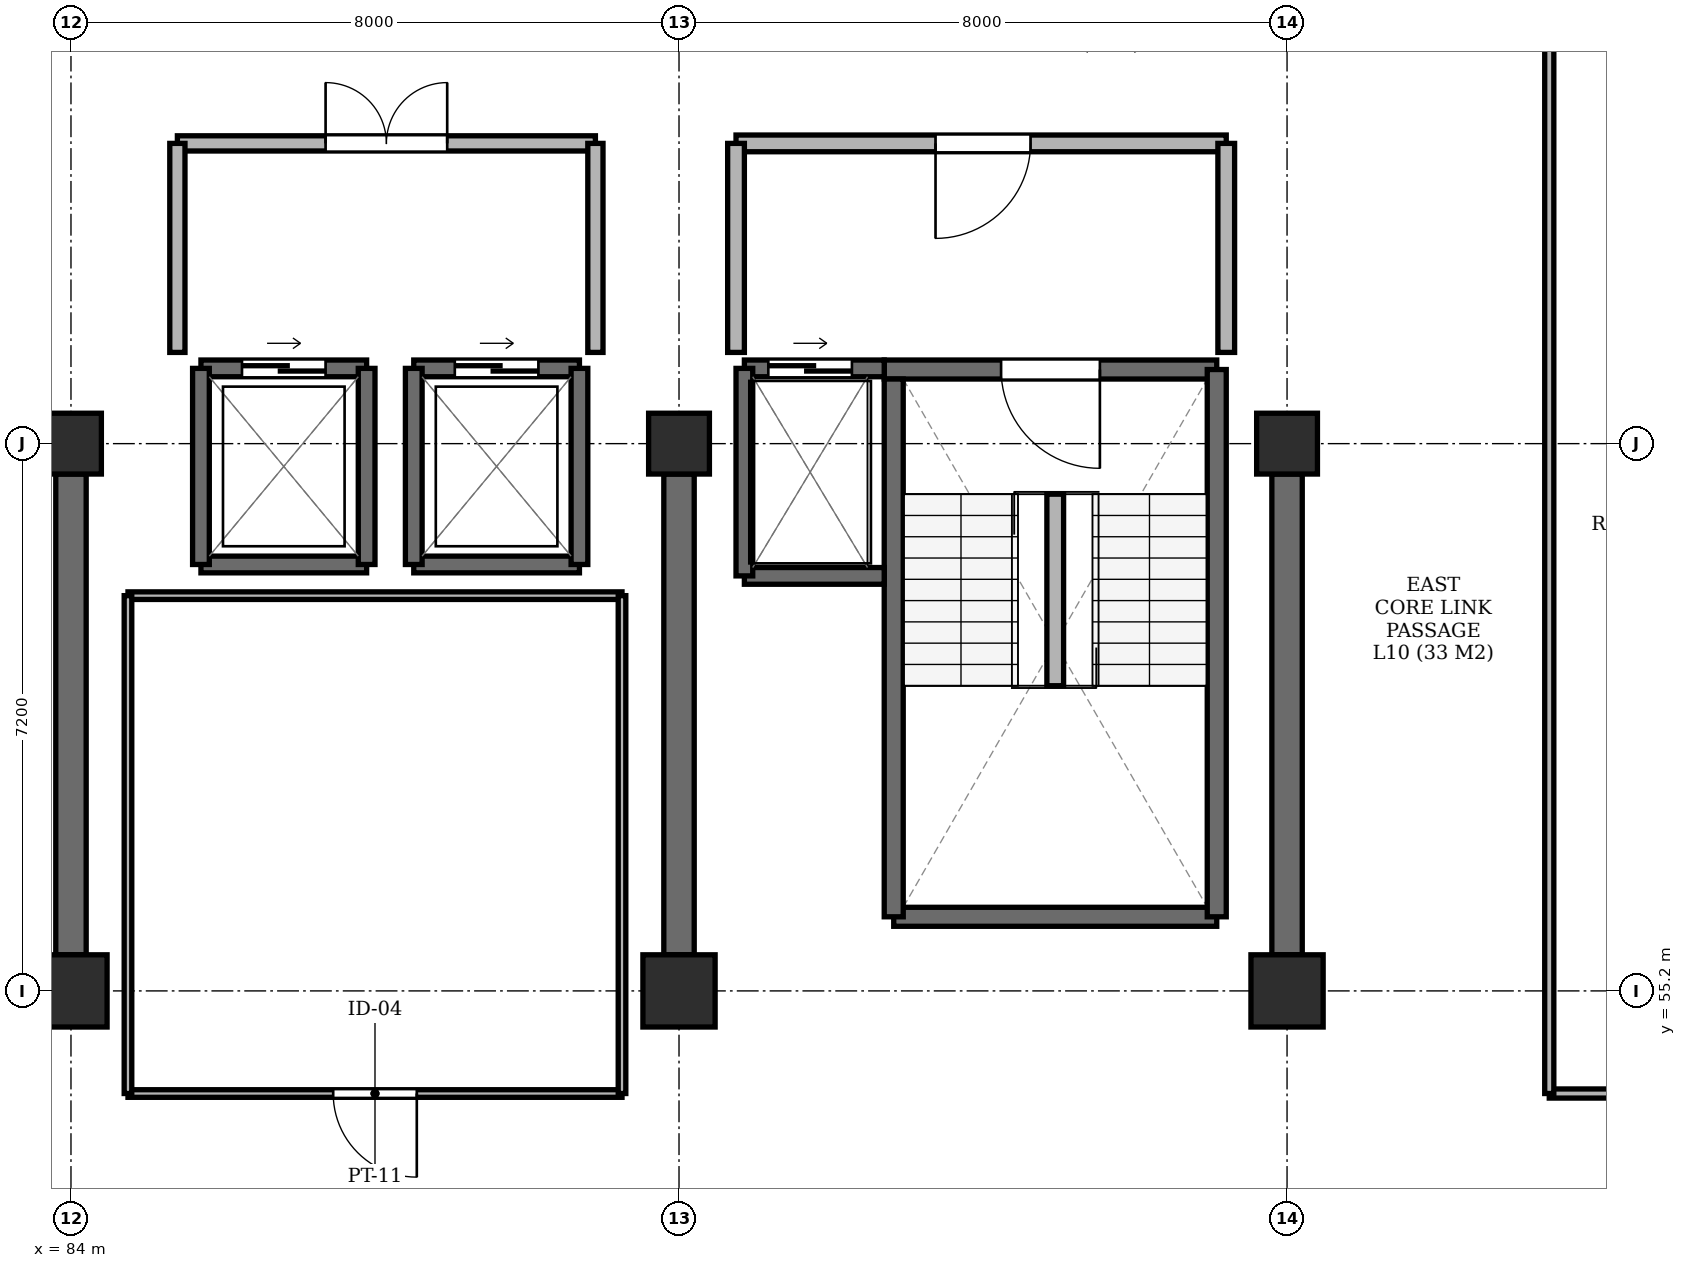
"""IFC4 building model, lengths in metres.
Left out: names, types, materials, properties, quantities, classifications, styles, units other than length and angle.
Written with IfcOpenShell. Run it as: python <this file> out.ifc"""

import sys

from ifc_helpers import new_model, si_unit, direction, frame, frame_2d, origin, origin_2d, place, context, subcontext, project, spatial, rectangle, extrude, element, fill, save


model = new_model("IFC4")
c1 = context("Model", 3, precision=1e-05, world=origin(), true_north=direction((0.0, 1.0)))
c2 = subcontext(c1, "Body", "Model", "MODEL_VIEW")
j1 = project(units=[si_unit("LENGTHUNIT", "METRE"), si_unit("PLANEANGLEUNIT", "RADIAN")], contexts=[c1])
p1 = place(None, origin())
s1 = spatial("IfcSite", under=j1, at=p1, CompositionType="ELEMENT")
p2 = place(p1, origin())
s2 = spatial("IfcBuilding", under=s1, at=p2, CompositionType="ELEMENT")
p3 = place(p2, frame((0.0, 0.0, 43.8)))
s3 = spatial("IfcBuildingStorey", under=s2, at=p3, CompositionType="ELEMENT", Elevation=43.8)
p4 = place(p3, frame((84.0, 55.2, -0.24), z_axis=(0.0, 0.0, 1.0), x_axis=(1.0, 0.0, 0.0)))
e1 = element("IfcColumn", 1, at=p4, inside=s3, PredefinedType="COLUMN", context=c2, shape_type="SweptSolid", body=[
    extrude(rectangle(XDim=0.95, YDim=0.95, at=origin_2d()), origin(), (0.0, 0.0, 1.0), 3.26),
])
p5 = place(p3, frame((84.0, 62.4, -0.24), z_axis=(0.0, 0.0, 1.0), x_axis=(1.0, 0.0, 0.0)))
e2 = element("IfcColumn", 2, at=p5, inside=s3, PredefinedType="COLUMN", context=c2, shape_type="SweptSolid", body=[
    extrude(rectangle(XDim=0.8, YDim=0.8, at=origin_2d()), origin(), (0.0, 0.0, 1.0), 3.26),
])
p6 = place(p3, frame((92.0, 55.2, -0.24), z_axis=(0.0, 0.0, 1.0), x_axis=(1.0, 0.0, 0.0)))
e3 = element("IfcColumn", 3, at=p6, inside=s3, PredefinedType="COLUMN", context=c2, shape_type="SweptSolid", body=[
    extrude(rectangle(XDim=0.95, YDim=0.95, at=origin_2d()), origin(), (0.0, 0.0, 1.0), 3.26),
])
p7 = place(p3, frame((92.0, 62.4, -0.24), z_axis=(0.0, 0.0, 1.0), x_axis=(1.0, 0.0, 0.0)))
e4 = element("IfcColumn", 4, at=p7, inside=s3, PredefinedType="COLUMN", context=c2, shape_type="SweptSolid", body=[
    extrude(rectangle(XDim=0.8, YDim=0.8, at=origin_2d()), origin(), (0.0, 0.0, 1.0), 3.26),
])
p8 = place(p3, frame((100.0, 55.2, -0.24), z_axis=(0.0, 0.0, 1.0), x_axis=(1.0, 0.0, 0.0)))
e5 = element("IfcColumn", 5, at=p8, inside=s3, PredefinedType="COLUMN", context=c2, shape_type="SweptSolid", body=[
    extrude(rectangle(XDim=0.95, YDim=0.95, at=origin_2d()), origin(), (0.0, 0.0, 1.0), 3.26),
])
p9 = place(p3, frame((100.0, 62.4, -0.24), z_axis=(0.0, 0.0, 1.0), x_axis=(1.0, 0.0, 0.0)))
e6 = element("IfcColumn", 6, at=p9, inside=s3, PredefinedType="COLUMN", context=c2, shape_type="SweptSolid", body=[
    extrude(rectangle(XDim=0.8, YDim=0.8, at=origin_2d()), origin(), (0.0, 0.0, 1.0), 3.26),
])
for number, where, z_axis, x_axis in (
    (7, (84.0, 55.675, 0.0), (0.0, 0.0, 1.0), (0.0, 1.0, 0.0)),
    (8, (92.0, 55.675, 0.0), (0.0, 0.0, 1.0), (0.0, 1.0, 0.0)),
    (9, (100.0, 55.675, 0.0), (0.0, 0.0, 1.0), (0.0, 1.0, 0.0)),
):
    element("IfcWall", number, at=place(p3, frame(where, z_axis=z_axis, x_axis=x_axis)), inside=s3, PredefinedType="SHEAR", context=c2, shape_type="SweptSolid", body=[
        extrude(rectangle(XDim=6.325, YDim=0.4, at=frame_2d((3.163, 0.0))), origin(), (0.0, 0.0, 1.0), 3.02),
    ])
p10 = place(p3, frame((94.825, 56.175, 0.0), z_axis=(0.0, 0.0, 1.0), x_axis=(1.0, 0.0, 0.0)))
e10 = element("IfcWall", 10, at=p10, inside=s3, PredefinedType="SHEAR", context=c2, shape_type="SweptSolid", body=[
    extrude(rectangle(XDim=4.25, YDim=0.25, at=frame_2d((2.125, 0.0))), origin(), (0.0, 0.0, 1.0), 3.02),
])
p11 = place(p3, frame((99.075, 63.375, 0.0), z_axis=(0.0, 0.0, 1.0), x_axis=(-1.0, 0.0, 0.0)))
e11 = element("IfcWall", 11, at=p11, inside=s3, PredefinedType="SHEAR", context=c2, shape_type="SweptSolid", body=[
    extrude(rectangle(XDim=4.375, YDim=0.25, at=frame_2d((2.188, 0.0))), origin(), (0.0, 0.0, 1.0), 3.02),
])
p12 = place(p11, frame((1.538, 0.0, 0.0)))
e12 = element("IfcOpeningElement", 12, at=p12, cuts=e11, PredefinedType="OPENING", context=c2, shape_type="SweptSolid", body=[
    extrude(rectangle(XDim=1.3, YDim=2.2, at=frame_2d((0.65, 1.1))), frame((0.0, 0.137, 0.0), z_axis=(0.0, -1.0, 0.0), x_axis=(1.0, 0.0, 0.0)), (0.0, 0.0, 1.0), 0.274),
])
p13 = place(p3, frame((94.825, 63.25, 0.0), z_axis=(0.0, 0.0, 1.0), x_axis=(0.0, -1.0, 0.0)))
e13 = element("IfcWall", 13, at=p13, inside=s3, PredefinedType="SHEAR", context=c2, shape_type="SweptSolid", body=[
    extrude(rectangle(XDim=7.075, YDim=0.25, at=frame_2d((3.538, 0.0))), origin(), (0.0, 0.0, 1.0), 3.02),
])
p14 = place(p3, frame((99.075, 56.175, 0.0), z_axis=(0.0, 0.0, 1.0), x_axis=(0.0, 1.0, 0.0)))
e14 = element("IfcWall", 14, at=p14, inside=s3, PredefinedType="SHEAR", context=c2, shape_type="SweptSolid", body=[
    extrude(rectangle(XDim=7.2, YDim=0.25, at=frame_2d((3.6, 0.0))), origin(), (0.0, 0.0, 1.0), 3.02),
])
p15 = place(p3, frame((96.95, 59.215, 0.0), z_axis=(0.0, 0.0, 1.0), x_axis=(0.0, 1.0, 0.0)))
e15 = element("IfcWall", 15, at=p15, inside=s3, PredefinedType="PARTITIONING", context=c2, shape_type="SweptSolid", body=[
    extrude(rectangle(XDim=2.52, YDim=0.22, at=frame_2d((1.26, 0.0))), origin(), (0.0, 0.0, 1.0), 3.02),
])
p16 = place(p3, frame((92.86, 60.66, 0.0), z_axis=(0.0, 0.0, 1.0), x_axis=(1.0, 0.0, 0.0)))
e16 = element("IfcWall", 16, at=p16, inside=s3, PredefinedType="SHEAR", context=c2, shape_type="SweptSolid", body=[
    extrude(rectangle(XDim=1.84, YDim=0.22, at=frame_2d((0.92, 0.0))), origin(), (0.0, 0.0, 1.0), 3.02),
])
p17 = place(p3, frame((94.7, 63.39, 0.0), z_axis=(0.0, 0.0, 1.0), x_axis=(-1.0, 0.0, 0.0)))
e17 = element("IfcWall", 17, at=p17, inside=s3, PredefinedType="SHEAR", context=c2, shape_type="SweptSolid", body=[
    extrude(rectangle(XDim=1.84, YDim=0.22, at=frame_2d((0.92, 0.0))), origin(), (0.0, 0.0, 1.0), 3.02),
])
p18 = place(p17, frame((0.425, 0.0, 0.0)))
e18 = element("IfcOpeningElement", 18, at=p18, cuts=e17, PredefinedType="OPENING", context=c2, shape_type="SweptSolid", body=[
    extrude(rectangle(XDim=1.1, YDim=2.2, at=frame_2d((0.55, 1.1))), frame((0.0, 0.122, 0.0), z_axis=(0.0, -1.0, 0.0), x_axis=(1.0, 0.0, 0.0)), (0.0, 0.0, 1.0), 0.244),
])
p19 = place(p3, frame((92.86, 63.39, 0.0), z_axis=(0.0, 0.0, 1.0), x_axis=(0.0, -1.0, 0.0)))
e19 = element("IfcWall", 19, at=p19, inside=s3, PredefinedType="SHEAR", context=c2, shape_type="SweptSolid", body=[
    extrude(rectangle(XDim=2.73, YDim=0.22, at=frame_2d((1.365, 0.0))), origin(), (0.0, 0.0, 1.0), 3.02),
])
p20 = place(p3, frame((85.71, 60.81, 0.0), z_axis=(0.0, 0.0, 1.0), x_axis=(1.0, 0.0, 0.0)))
e20 = element("IfcWall", 20, at=p20, inside=s3, PredefinedType="SHEAR", context=c2, shape_type="SweptSolid", body=[
    extrude(rectangle(XDim=2.18, YDim=0.22, at=frame_2d((1.09, 0.0))), origin(), (0.0, 0.0, 1.0), 3.02),
])
p21 = place(p3, frame((87.89, 63.39, 0.0), z_axis=(0.0, 0.0, 1.0), x_axis=(-1.0, 0.0, 0.0)))
e21 = element("IfcWall", 21, at=p21, inside=s3, PredefinedType="SHEAR", context=c2, shape_type="SweptSolid", body=[
    extrude(rectangle(XDim=2.18, YDim=0.22, at=frame_2d((1.09, 0.0))), origin(), (0.0, 0.0, 1.0), 3.02),
])
p22 = place(p21, frame((0.54, 0.0, 0.0)))
e22 = element("IfcOpeningElement", 22, at=p22, cuts=e21, PredefinedType="OPENING", context=c2, shape_type="SweptSolid", body=[
    extrude(rectangle(XDim=1.1, YDim=2.2, at=frame_2d((0.55, 1.1))), frame((0.0, 0.122, 0.0), z_axis=(0.0, -1.0, 0.0), x_axis=(1.0, 0.0, 0.0)), (0.0, 0.0, 1.0), 0.244),
])
for number, where, z_axis, x_axis in (
    (23, (85.71, 63.39, 0.0), (0.0, 0.0, 1.0), (0.0, -1.0, 0.0)),
    (24, (87.89, 60.81, 0.0), (0.0, 0.0, 1.0), (0.0, 1.0, 0.0)),
):
    element("IfcWall", number, at=place(p3, frame(where, z_axis=z_axis, x_axis=x_axis)), inside=s3, PredefinedType="SHEAR", context=c2, shape_type="SweptSolid", body=[
        extrude(rectangle(XDim=2.58, YDim=0.22, at=frame_2d((1.29, 0.0))), origin(), (0.0, 0.0, 1.0), 3.02),
    ])
p23 = place(p3, frame((88.51, 60.81, 0.0), z_axis=(0.0, 0.0, 1.0), x_axis=(1.0, 0.0, 0.0)))
e25 = element("IfcWall", 25, at=p23, inside=s3, PredefinedType="SHEAR", context=c2, shape_type="SweptSolid", body=[
    extrude(rectangle(XDim=2.18, YDim=0.22, at=frame_2d((1.09, 0.0))), origin(), (0.0, 0.0, 1.0), 3.02),
])
p24 = place(p3, frame((90.69, 63.39, 0.0), z_axis=(0.0, 0.0, 1.0), x_axis=(-1.0, 0.0, 0.0)))
e26 = element("IfcWall", 26, at=p24, inside=s3, PredefinedType="SHEAR", context=c2, shape_type="SweptSolid", body=[
    extrude(rectangle(XDim=2.18, YDim=0.22, at=frame_2d((1.09, 0.0))), origin(), (0.0, 0.0, 1.0), 3.02),
])
p25 = place(p24, frame((0.54, 0.0, 0.0)))
e27 = element("IfcOpeningElement", 27, at=p25, cuts=e26, PredefinedType="OPENING", context=c2, shape_type="SweptSolid", body=[
    extrude(rectangle(XDim=1.1, YDim=2.2, at=frame_2d((0.55, 1.1))), frame((0.0, 0.122, 0.0), z_axis=(0.0, -1.0, 0.0), x_axis=(1.0, 0.0, 0.0)), (0.0, 0.0, 1.0), 0.244),
])
for number, where, z_axis, x_axis in (
    (28, (88.51, 63.39, 0.0), (0.0, 0.0, 1.0), (0.0, -1.0, 0.0)),
    (29, (90.69, 60.81, 0.0), (0.0, 0.0, 1.0), (0.0, 1.0, 0.0)),
):
    element("IfcWall", number, at=place(p3, frame(where, z_axis=z_axis, x_axis=x_axis)), inside=s3, PredefinedType="SHEAR", context=c2, shape_type="SweptSolid", body=[
        extrude(rectangle(XDim=2.58, YDim=0.22, at=frame_2d((1.29, 0.0))), origin(), (0.0, 0.0, 1.0), 3.02),
    ])
p26 = place(p3, frame((92.75, 66.35, 0.0), z_axis=(0.0, 0.0, 1.0), x_axis=(1.0, 0.0, 0.0)))
e30 = element("IfcWall", 30, at=p26, inside=s3, PredefinedType="PARTITIONING", context=c2, shape_type="SweptSolid", body=[
    extrude(rectangle(XDim=6.45, YDim=0.22, at=frame_2d((3.225, 0.0))), origin(), (0.0, 0.0, 1.0), 2.53),
])
p27 = place(p26, frame((2.625, 0.0, 0.0)))
e31 = element("IfcOpeningElement", 31, at=p27, cuts=e30, PredefinedType="OPENING", context=c2, shape_type="SweptSolid", body=[
    extrude(rectangle(XDim=1.25, YDim=2.2, at=frame_2d((0.625, 1.1))), frame((0.0, 0.122, 0.0), z_axis=(0.0, -1.0, 0.0), x_axis=(1.0, 0.0, 0.0)), (0.0, 0.0, 1.0), 0.244),
])
for number, where, z_axis, x_axis in (
    (32, (92.75, 63.6, 0.0), (0.0, 0.0, 1.0), (0.0, 1.0, 0.0)),
    (33, (99.2, 63.6, 0.0), (0.0, 0.0, 1.0), (0.0, 1.0, 0.0)),
):
    element("IfcWall", number, at=place(p3, frame(where, z_axis=z_axis, x_axis=x_axis)), inside=s3, PredefinedType="PARTITIONING", context=c2, shape_type="SweptSolid", body=[
        extrude(rectangle(XDim=2.75, YDim=0.22, at=frame_2d((1.375, 0.0))), origin(), (0.0, 0.0, 1.0), 2.53),
    ])
p28 = place(p3, frame((85.4, 66.35, 0.0), z_axis=(0.0, 0.0, 1.0), x_axis=(1.0, 0.0, 0.0)))
e34 = element("IfcWall", 34, at=p28, inside=s3, PredefinedType="PARTITIONING", context=c2, shape_type="SweptSolid", body=[
    extrude(rectangle(XDim=5.5, YDim=0.2, at=frame_2d((2.75, 0.0))), origin(), (0.0, 0.0, 1.0), 2.53),
])
p29 = place(p28, frame((1.95, 0.0, 0.0)))
e35 = element("IfcOpeningElement", 35, at=p29, cuts=e34, PredefinedType="OPENING", context=c2, shape_type="SweptSolid", body=[
    extrude(rectangle(XDim=1.6, YDim=2.2, at=frame_2d((0.8, 1.1))), frame((0.0, 0.112, 0.0), z_axis=(0.0, -1.0, 0.0), x_axis=(1.0, 0.0, 0.0)), (0.0, 0.0, 1.0), 0.224),
])
for number, where, z_axis, x_axis in (
    (36, (85.4, 63.6, 0.0), (0.0, 0.0, 1.0), (0.0, 1.0, 0.0)),
    (37, (90.9, 63.6, 0.0), (0.0, 0.0, 1.0), (0.0, 1.0, 0.0)),
):
    element("IfcWall", number, at=place(p3, frame(where, z_axis=z_axis, x_axis=x_axis)), inside=s3, PredefinedType="PARTITIONING", context=c2, shape_type="SweptSolid", body=[
        extrude(rectangle(XDim=2.75, YDim=0.2, at=frame_2d((1.375, 0.0))), origin(), (0.0, 0.0, 1.0), 2.53),
    ])
p30 = place(p3, frame((103.45, 53.85, 0.0), z_axis=(0.0, 0.0, 1.0), x_axis=(1.0, 0.0, 0.0)))
e38 = element("IfcWall", 38, at=p30, inside=s3, PredefinedType="PARTITIONING", context=c2, shape_type="SweptSolid", body=[
    extrude(rectangle(XDim=3.75, YDim=0.12, at=frame_2d((1.875, 0.0))), origin(), (0.0, 0.0, 1.0), 2.53),
])
p31 = place(p30, frame((1.35, 0.0, 0.0)))
e39 = element("IfcOpeningElement", 39, at=p31, cuts=e38, PredefinedType="OPENING", context=c2, shape_type="SweptSolid", body=[
    extrude(rectangle(XDim=1.0, YDim=2.15, at=frame_2d((0.5, 1.075))), frame((0.0, 0.072, 0.0), z_axis=(0.0, -1.0, 0.0), x_axis=(1.0, 0.0, 0.0)), (0.0, 0.0, 1.0), 0.144),
])
p32 = place(p3, frame((103.45, 53.85, 0.0), z_axis=(0.0, 0.0, 1.0), x_axis=(0.0, 1.0, 0.0)))
e40 = element("IfcWall", 40, at=p32, inside=s3, PredefinedType="PARTITIONING", context=c2, shape_type="SweptSolid", body=[
    extrude(rectangle(XDim=14.95, YDim=0.12, at=frame_2d((7.475, 0.0))), origin(), (0.0, 0.0, 1.0), 2.53),
])
p33 = place(p3, frame((84.75, 53.85, 0.0), z_axis=(0.0, 0.0, 1.0), x_axis=(1.0, 0.0, 0.0)))
e41 = element("IfcWall", 41, at=p33, inside=s3, PredefinedType="PARTITIONING", context=c2, shape_type="SweptSolid", body=[
    extrude(rectangle(XDim=6.5, YDim=0.1, at=frame_2d((3.25, 0.0))), origin(), (0.0, 0.0, 1.0), 2.53),
])
p34 = place(p33, frame((2.7, 0.0, 0.0)))
e42 = element("IfcOpeningElement", 42, at=p34, cuts=e41, PredefinedType="OPENING", context=c2, shape_type="SweptSolid", body=[
    extrude(rectangle(XDim=1.1, YDim=2.15, at=frame_2d((0.55, 1.075))), frame((0.0, 0.062, 0.0), z_axis=(0.0, -1.0, 0.0), x_axis=(1.0, 0.0, 0.0)), (0.0, 0.0, 1.0), 0.124),
])
p35 = place(p3, frame((84.75, 60.4, 0.0), z_axis=(0.0, 0.0, 1.0), x_axis=(1.0, 0.0, 0.0)))
e43 = element("IfcWall", 43, at=p35, inside=s3, PredefinedType="PARTITIONING", context=c2, shape_type="SweptSolid", body=[
    extrude(rectangle(XDim=6.5, YDim=0.1, at=frame_2d((3.25, 0.0))), origin(), (0.0, 0.0, 1.0), 2.53),
])
for number, where, z_axis, x_axis in (
    (44, (84.75, 53.85, 0.0), (0.0, 0.0, 1.0), (0.0, 1.0, 0.0)),
    (45, (91.25, 53.85, 0.0), (0.0, 0.0, 1.0), (0.0, 1.0, 0.0)),
):
    element("IfcWall", number, at=place(p3, frame(where, z_axis=z_axis, x_axis=x_axis)), inside=s3, PredefinedType="PARTITIONING", context=c2, shape_type="SweptSolid", body=[
        extrude(rectangle(XDim=6.55, YDim=0.1, at=frame_2d((3.275, 0.0))), origin(), (0.0, 0.0, 1.0), 2.53),
    ])
p36 = place(p12, origin())
e46 = element("IfcDoor", 46, at=p36, inside=s3, OperationType="SINGLE_SWING_LEFT", PredefinedType="DOOR", context=c2, shape_type="SweptSolid", body=[
    extrude(rectangle(XDim=1.3, YDim=2.2, at=frame_2d((0.65, 1.1))), frame((0.0, 0.025, 0.0), z_axis=(0.0, -1.0, 0.0), x_axis=(1.0, 0.0, 0.0)), (0.0, 0.0, 1.0), 0.05),
])
fill(e12, e46)
p37 = place(p18, origin())
e47 = element("IfcDoor", 47, at=p37, inside=s3, OperationType="SLIDING_TO_LEFT", PredefinedType="DOOR", context=c2, shape_type="SweptSolid", body=[
    extrude(rectangle(XDim=1.1, YDim=2.2, at=frame_2d((0.55, 1.1))), frame((0.0, 0.025, 0.0), z_axis=(0.0, -1.0, 0.0), x_axis=(1.0, 0.0, 0.0)), (0.0, 0.0, 1.0), 0.05),
])
fill(e18, e47)
p38 = place(p22, origin())
e48 = element("IfcDoor", 48, at=p38, inside=s3, OperationType="SLIDING_TO_LEFT", PredefinedType="DOOR", context=c2, shape_type="SweptSolid", body=[
    extrude(rectangle(XDim=1.1, YDim=2.2, at=frame_2d((0.55, 1.1))), frame((0.0, 0.025, 0.0), z_axis=(0.0, -1.0, 0.0), x_axis=(1.0, 0.0, 0.0)), (0.0, 0.0, 1.0), 0.05),
])
fill(e22, e48)
p39 = place(p25, origin())
e49 = element("IfcDoor", 49, at=p39, inside=s3, OperationType="SLIDING_TO_LEFT", PredefinedType="DOOR", context=c2, shape_type="SweptSolid", body=[
    extrude(rectangle(XDim=1.1, YDim=2.2, at=frame_2d((0.55, 1.1))), frame((0.0, 0.025, 0.0), z_axis=(0.0, -1.0, 0.0), x_axis=(1.0, 0.0, 0.0)), (0.0, 0.0, 1.0), 0.05),
])
fill(e27, e49)
p40 = place(p27, frame((1.25, 0.0, 0.0), z_axis=(0.0, 0.0, 1.0), x_axis=(-1.0, 0.0, 0.0)))
e50 = element("IfcDoor", 50, at=p40, inside=s3, OperationType="SINGLE_SWING_LEFT", PredefinedType="DOOR", context=c2, shape_type="SweptSolid", body=[
    extrude(rectangle(XDim=1.25, YDim=2.2, at=frame_2d((0.625, 1.1))), frame((0.0, 0.025, 0.0), z_axis=(0.0, -1.0, 0.0), x_axis=(1.0, 0.0, 0.0)), (0.0, 0.0, 1.0), 0.05),
])
fill(e31, e50)
p41 = place(p29, origin())
e51 = element("IfcDoor", 51, at=p41, inside=s3, OperationType="DOUBLE_DOOR_SINGLE_SWING", PredefinedType="DOOR", context=c2, shape_type="SweptSolid", body=[
    extrude(rectangle(XDim=1.6, YDim=2.2, at=frame_2d((0.8, 1.1))), frame((0.0, 0.025, 0.0), z_axis=(0.0, -1.0, 0.0), x_axis=(1.0, 0.0, 0.0)), (0.0, 0.0, 1.0), 0.05),
])
fill(e35, e51)
p42 = place(p34, frame((1.1, 0.0, 0.0), z_axis=(0.0, 0.0, 1.0), x_axis=(-1.0, 0.0, 0.0)))
e52 = element("IfcDoor", 52, at=p42, inside=s3, OperationType="SINGLE_SWING_RIGHT", PredefinedType="DOOR", context=c2, shape_type="SweptSolid", body=[
    extrude(rectangle(XDim=1.1, YDim=2.15, at=frame_2d((0.55, 1.075))), frame((0.0, 0.025, 0.0), z_axis=(0.0, -1.0, 0.0), x_axis=(1.0, 0.0, 0.0)), (0.0, 0.0, 1.0), 0.05),
])
fill(e42, e52)
save(model, sys.argv[1])
